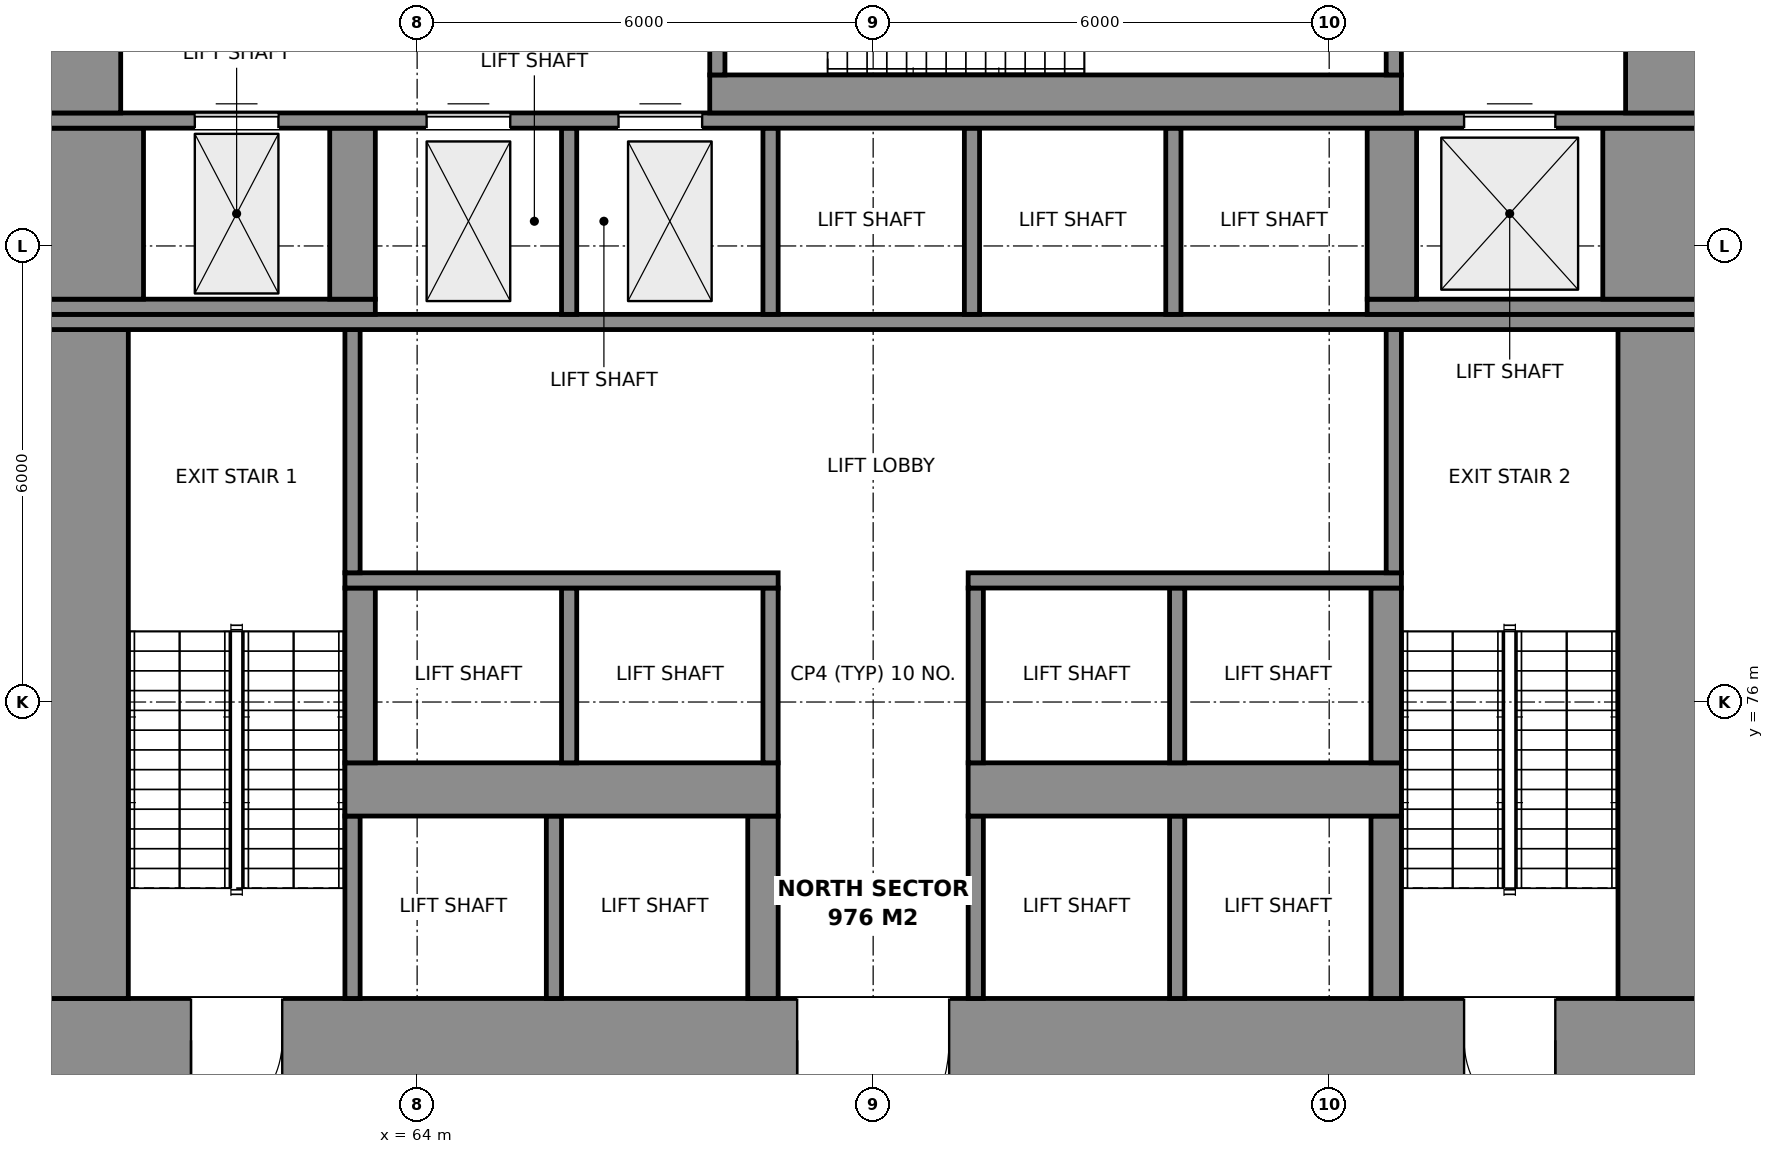
"""IFC4 building model, lengths in metres.
Left out: names, types, materials, properties, quantities, classifications, styles, units other than length and angle.
Written with IfcOpenShell. Run it as: python <this file> out.ifc"""

import sys

from ifc_helpers import new_model, si_unit, direction, frame, frame_2d, origin, place, context, subcontext, project, spatial, rectangle, extrude, element, fill, save


model = new_model("IFC4")
c1 = context("Model", 3, precision=1e-05, world=origin(), true_north=direction((0.0, 1.0)))
c2 = subcontext(c1, "Body", "Model", "MODEL_VIEW")
j1 = project(units=[si_unit("LENGTHUNIT", "METRE"), si_unit("PLANEANGLEUNIT", "RADIAN")], contexts=[c1])
p1 = place(None, origin())
s1 = spatial("IfcSite", under=j1, at=p1, CompositionType="ELEMENT")
p2 = place(p1, origin())
s2 = spatial("IfcBuilding", under=s1, at=p2, CompositionType="ELEMENT")
p3 = place(p2, frame((0.0, 0.0, 137.6)))
s3 = spatial("IfcBuildingStorey", under=s2, at=p3, CompositionType="ELEMENT", Elevation=137.6)
p4 = place(p3, frame((59.0, 71.55, 0.0), z_axis=(0.0, 0.0, 1.0), x_axis=(1.0, 0.0, 0.0)))
e1 = element("IfcWall", 1, at=p4, inside=s3, PredefinedType="SHEAR", context=c2, shape_type="SweptSolid", body=[
    extrude(rectangle(XDim=22.0, YDim=1.1, at=frame_2d((11.0, 0.0))), origin(), (0.0, 0.0, 1.0), 5.0),
])
p5 = place(p4, frame((2.025, 0.0, 0.0)))
e2 = element("IfcOpeningElement", 2, at=p5, cuts=e1, PredefinedType="OPENING", context=c2, shape_type="SweptSolid", body=[
    extrude(rectangle(XDim=1.2, YDim=2.1, at=frame_2d((0.6, 1.05))), frame((0.0, 0.56, 0.0), z_axis=(0.0, -1.0, 0.0), x_axis=(1.0, 0.0, 0.0)), (0.0, 0.0, 1.0), 1.12),
])
p6 = place(p4, frame((18.775, 0.0, 0.0)))
e3 = element("IfcOpeningElement", 3, at=p6, cuts=e1, PredefinedType="OPENING", context=c2, shape_type="SweptSolid", body=[
    extrude(rectangle(XDim=1.2, YDim=2.1, at=frame_2d((0.6, 1.05))), frame((0.0, 0.56, 0.0), z_axis=(0.0, -1.0, 0.0), x_axis=(1.0, 0.0, 0.0)), (0.0, 0.0, 1.0), 1.12),
])
p7 = place(p4, frame((10.0, 0.0, 0.0)))
e4 = element("IfcOpeningElement", 4, at=p7, cuts=e1, PredefinedType="OPENING", context=c2, shape_type="SweptSolid", body=[
    extrude(rectangle(XDim=2.0, YDim=2.1, at=frame_2d((1.0, 1.05))), frame((0.0, 0.56, 0.0), z_axis=(0.0, -1.0, 0.0), x_axis=(1.0, 0.0, 0.0)), (0.0, 0.0, 1.0), 1.12),
])
p8 = place(p3, frame((59.6, 72.1, 0.0), z_axis=(0.0, 0.0, 1.0), x_axis=(0.0, 1.0, 0.0)))
e5 = element("IfcWall", 5, at=p8, inside=s3, PredefinedType="SHEAR", context=c2, shape_type="SweptSolid", body=[
    extrude(rectangle(XDim=8.8, YDim=1.2, at=frame_2d((4.4, 0.0))), origin(), (0.0, 0.0, 1.0), 5.0),
])
for number, where, z_axis, x_axis in (
    (6, (63.15, 72.1, 0.0), (0.0, 0.0, 1.0), (0.0, 1.0, 0.0)),
    (7, (65.8, 72.1, 0.0), (0.0, 0.0, 1.0), (0.0, 1.0, 0.0)),
):
    element("IfcWall", number, at=place(p3, frame(where, z_axis=z_axis, x_axis=x_axis)), inside=s3, PredefinedType="SHEAR", context=c2, shape_type="SweptSolid", body=[
        extrude(rectangle(XDim=2.4, YDim=0.2, at=frame_2d((1.2, 0.0))), origin(), (0.0, 0.0, 1.0), 5.0),
    ])
p9 = place(p3, frame((68.55, 72.1, 0.0), z_axis=(0.0, 0.0, 1.0), x_axis=(0.0, 1.0, 0.0)))
e8 = element("IfcWall", 8, at=p9, inside=s3, PredefinedType="SHEAR", context=c2, shape_type="SweptSolid", body=[
    extrude(rectangle(XDim=2.4, YDim=0.4, at=frame_2d((1.2, 0.0))), origin(), (0.0, 0.0, 1.0), 5.0),
])
for number, where, z_axis, x_axis in (
    (9, (71.35, 72.1, 0.0), (0.0, 0.0, 1.0), (0.0, 1.0, 0.0)),
    (10, (74.0, 72.1, 0.0), (0.0, 0.0, 1.0), (0.0, 1.0, 0.0)),
):
    element("IfcWall", number, at=place(p3, frame(where, z_axis=z_axis, x_axis=x_axis)), inside=s3, PredefinedType="SHEAR", context=c2, shape_type="SweptSolid", body=[
        extrude(rectangle(XDim=2.4, YDim=0.2, at=frame_2d((1.2, 0.0))), origin(), (0.0, 0.0, 1.0), 5.0),
    ])
p10 = place(p3, frame((76.75, 72.1, 0.0), z_axis=(0.0, 0.0, 1.0), x_axis=(0.0, 1.0, 0.0)))
e11 = element("IfcWall", 11, at=p10, inside=s3, PredefinedType="SHEAR", context=c2, shape_type="SweptSolid", body=[
    extrude(rectangle(XDim=2.4, YDim=0.4, at=frame_2d((1.2, 0.0))), origin(), (0.0, 0.0, 1.0), 5.0),
])
p11 = place(p3, frame((80.4, 72.1, 0.0), z_axis=(0.0, 0.0, 1.0), x_axis=(0.0, 1.0, 0.0)))
e12 = element("IfcWall", 12, at=p11, inside=s3, PredefinedType="SHEAR", context=c2, shape_type="SweptSolid", body=[
    extrude(rectangle(XDim=8.8, YDim=1.2, at=frame_2d((4.4, 0.0))), origin(), (0.0, 0.0, 1.0), 5.0),
])
for number, where, z_axis, x_axis in (
    (13, (63.05, 74.85, 0.0), (0.0, 0.0, 1.0), (1.0, 0.0, 0.0)),
    (14, (71.25, 74.85, 0.0), (0.0, 0.0, 1.0), (1.0, 0.0, 0.0)),
):
    element("IfcWall", number, at=place(p3, frame(where, z_axis=z_axis, x_axis=x_axis)), inside=s3, PredefinedType="SHEAR", context=c2, shape_type="SweptSolid", body=[
        extrude(rectangle(XDim=5.7, YDim=0.7, at=frame_2d((2.85, 0.0))), origin(), (0.0, 0.0, 1.0), 5.0),
    ])
p12 = place(p3, frame((63.25, 75.2, 0.0), z_axis=(0.0, 0.0, 1.0), x_axis=(0.0, 1.0, 0.0)))
e15 = element("IfcWall", 15, at=p12, inside=s3, PredefinedType="SHEAR", context=c2, shape_type="SweptSolid", body=[
    extrude(rectangle(XDim=2.3, YDim=0.4, at=frame_2d((1.15, 0.0))), origin(), (0.0, 0.0, 1.0), 5.0),
])
for number, where, z_axis, x_axis in (
    (16, (66.0, 75.2, 0.0), (0.0, 0.0, 1.0), (0.0, 1.0, 0.0)),
    (17, (68.65, 75.2, 0.0), (0.0, 0.0, 1.0), (0.0, 1.0, 0.0)),
    (18, (71.35, 75.2, 0.0), (0.0, 0.0, 1.0), (0.0, 1.0, 0.0)),
    (19, (74.0, 75.2, 0.0), (0.0, 0.0, 1.0), (0.0, 1.0, 0.0)),
):
    element("IfcWall", number, at=place(p3, frame(where, z_axis=z_axis, x_axis=x_axis)), inside=s3, PredefinedType="SHEAR", context=c2, shape_type="SweptSolid", body=[
        extrude(rectangle(XDim=2.3, YDim=0.2, at=frame_2d((1.15, 0.0))), origin(), (0.0, 0.0, 1.0), 5.0),
    ])
p13 = place(p3, frame((76.75, 75.2, 0.0), z_axis=(0.0, 0.0, 1.0), x_axis=(0.0, 1.0, 0.0)))
e20 = element("IfcWall", 20, at=p13, inside=s3, PredefinedType="SHEAR", context=c2, shape_type="SweptSolid", body=[
    extrude(rectangle(XDim=2.3, YDim=0.4, at=frame_2d((1.15, 0.0))), origin(), (0.0, 0.0, 1.0), 5.0),
])
for number, where, z_axis, x_axis in (
    (21, (63.05, 77.6, 0.0), (0.0, 0.0, 1.0), (1.0, 0.0, 0.0)),
    (22, (71.25, 77.6, 0.0), (0.0, 0.0, 1.0), (1.0, 0.0, 0.0)),
):
    element("IfcWall", number, at=place(p3, frame(where, z_axis=z_axis, x_axis=x_axis)), inside=s3, PredefinedType="SHEAR", context=c2, shape_type="SweptSolid", body=[
        extrude(rectangle(XDim=5.7, YDim=0.2, at=frame_2d((2.85, 0.0))), origin(), (0.0, 0.0, 1.0), 5.0),
    ])
for number, where, z_axis, x_axis in (
    (23, (63.15, 77.7, 0.0), (0.0, 0.0, 1.0), (0.0, 1.0, 0.0)),
    (24, (76.85, 77.7, 0.0), (0.0, 0.0, 1.0), (0.0, 1.0, 0.0)),
):
    element("IfcWall", number, at=place(p3, frame(where, z_axis=z_axis, x_axis=x_axis)), inside=s3, PredefinedType="SHEAR", context=c2, shape_type="SweptSolid", body=[
        extrude(rectangle(XDim=3.2, YDim=0.2, at=frame_2d((1.6, 0.0))), origin(), (0.0, 0.0, 1.0), 5.0),
    ])
p14 = place(p3, frame((59.0, 81.0, 0.0), z_axis=(0.0, 0.0, 1.0), x_axis=(1.0, 0.0, 0.0)))
e25 = element("IfcWall", 25, at=p14, inside=s3, PredefinedType="SHEAR", context=c2, shape_type="SweptSolid", body=[
    extrude(rectangle(XDim=22.0, YDim=0.2, at=frame_2d((11.0, 0.0))), origin(), (0.0, 0.0, 1.0), 5.0),
])
p15 = place(p3, frame((59.0, 81.2, 0.0), z_axis=(0.0, 0.0, 1.0), x_axis=(1.0, 0.0, 0.0)))
e26 = element("IfcWall", 26, at=p15, inside=s3, PredefinedType="SHEAR", context=c2, shape_type="SweptSolid", body=[
    extrude(rectangle(XDim=4.45, YDim=0.2, at=frame_2d((2.225, 0.0))), origin(), (0.0, 0.0, 1.0), 5.0),
])
for number, where, z_axis, x_axis in (
    (27, (66.0, 81.1, 0.0), (0.0, 0.0, 1.0), (0.0, 1.0, 0.0)),
    (28, (68.65, 81.1, 0.0), (0.0, 0.0, 1.0), (0.0, 1.0, 0.0)),
    (29, (71.3, 81.1, 0.0), (0.0, 0.0, 1.0), (0.0, 1.0, 0.0)),
    (30, (73.95, 81.1, 0.0), (0.0, 0.0, 1.0), (0.0, 1.0, 0.0)),
):
    element("IfcWall", number, at=place(p3, frame(where, z_axis=z_axis, x_axis=x_axis)), inside=s3, PredefinedType="SHEAR", context=c2, shape_type="SweptSolid", body=[
        extrude(rectangle(XDim=2.45, YDim=0.2, at=frame_2d((1.225, 0.0))), origin(), (0.0, 0.0, 1.0), 5.0),
    ])
p16 = place(p3, frame((76.5, 81.2, 0.0), z_axis=(0.0, 0.0, 1.0), x_axis=(1.0, 0.0, 0.0)))
e31 = element("IfcWall", 31, at=p16, inside=s3, PredefinedType="SHEAR", context=c2, shape_type="SweptSolid", body=[
    extrude(rectangle(XDim=4.5, YDim=0.2, at=frame_2d((2.25, 0.0))), origin(), (0.0, 0.0, 1.0), 5.0),
])
p17 = place(p3, frame((59.7, 81.3, 0.0), z_axis=(0.0, 0.0, 1.0), x_axis=(0.0, 1.0, 0.0)))
e32 = element("IfcWall", 32, at=p17, inside=s3, PredefinedType="SHEAR", context=c2, shape_type="SweptSolid", body=[
    extrude(rectangle(XDim=2.25, YDim=1.4, at=frame_2d((1.125, 0.0))), origin(), (0.0, 0.0, 1.0), 5.0),
])
p18 = place(p3, frame((63.15, 81.3, 0.0), z_axis=(0.0, 0.0, 1.0), x_axis=(0.0, 1.0, 0.0)))
e33 = element("IfcWall", 33, at=p18, inside=s3, PredefinedType="SHEAR", context=c2, shape_type="SweptSolid", body=[
    extrude(rectangle(XDim=2.25, YDim=0.6, at=frame_2d((1.125, 0.0))), origin(), (0.0, 0.0, 1.0), 5.0),
])
p19 = place(p3, frame((76.825, 81.3, 0.0), z_axis=(0.0, 0.0, 1.0), x_axis=(0.0, 1.0, 0.0)))
e34 = element("IfcWall", 34, at=p19, inside=s3, PredefinedType="SHEAR", context=c2, shape_type="SweptSolid", body=[
    extrude(rectangle(XDim=2.25, YDim=0.65, at=frame_2d((1.125, 0.0))), origin(), (0.0, 0.0, 1.0), 5.0),
])
p20 = place(p3, frame((80.3, 81.3, 0.0), z_axis=(0.0, 0.0, 1.0), x_axis=(0.0, 1.0, 0.0)))
e35 = element("IfcWall", 35, at=p20, inside=s3, PredefinedType="SHEAR", context=c2, shape_type="SweptSolid", body=[
    extrude(rectangle(XDim=2.25, YDim=1.4, at=frame_2d((1.125, 0.0))), origin(), (0.0, 0.0, 1.0), 5.0),
])
p21 = place(p3, frame((59.0, 83.65, 0.0), z_axis=(0.0, 0.0, 1.0), x_axis=(1.0, 0.0, 0.0)))
e36 = element("IfcWall", 36, at=p21, inside=s3, PredefinedType="SHEAR", context=c2, shape_type="SweptSolid", body=[
    extrude(rectangle(XDim=22.0, YDim=0.2, at=frame_2d((11.0, 0.0))), origin(), (0.0, 0.0, 1.0), 5.0),
])
p22 = place(p21, frame((5.125, 0.0, 0.0)))
e37 = element("IfcOpeningElement", 37, at=p22, cuts=e36, PredefinedType="OPENING", context=c2, shape_type="SweptSolid", body=[
    extrude(rectangle(XDim=1.1, YDim=2.1, at=frame_2d((0.55, 1.05))), frame((0.0, 0.11, 0.0), z_axis=(0.0, -1.0, 0.0), x_axis=(1.0, 0.0, 0.0)), (0.0, 0.0, 1.0), 0.22),
])
p23 = place(p21, frame((7.65, 0.0, 0.0)))
e38 = element("IfcOpeningElement", 38, at=p23, cuts=e36, PredefinedType="OPENING", context=c2, shape_type="SweptSolid", body=[
    extrude(rectangle(XDim=1.1, YDim=2.1, at=frame_2d((0.55, 1.05))), frame((0.0, 0.11, 0.0), z_axis=(0.0, -1.0, 0.0), x_axis=(1.0, 0.0, 0.0)), (0.0, 0.0, 1.0), 0.22),
])
p24 = place(p21, frame((18.775, 0.0, 0.0)))
e39 = element("IfcOpeningElement", 39, at=p24, cuts=e36, PredefinedType="OPENING", context=c2, shape_type="SweptSolid", body=[
    extrude(rectangle(XDim=1.2, YDim=2.1, at=frame_2d((0.6, 1.05))), frame((0.0, 0.11, 0.0), z_axis=(0.0, -1.0, 0.0), x_axis=(1.0, 0.0, 0.0)), (0.0, 0.0, 1.0), 0.22),
])
p25 = place(p21, frame((2.075, 0.0, 0.0)))
e40 = element("IfcOpeningElement", 40, at=p25, cuts=e36, PredefinedType="OPENING", context=c2, shape_type="SweptSolid", body=[
    extrude(rectangle(XDim=1.1, YDim=2.1, at=frame_2d((0.55, 1.05))), frame((0.0, 0.11, 0.0), z_axis=(0.0, -1.0, 0.0), x_axis=(1.0, 0.0, 0.0)), (0.0, 0.0, 1.0), 0.22),
])
p26 = place(p3, frame((59.55, 83.75, 0.0), z_axis=(0.0, 0.0, 1.0), x_axis=(0.0, 1.0, 0.0)))
e41 = element("IfcWall", 41, at=p26, inside=s3, PredefinedType="SHEAR", context=c2, shape_type="SweptSolid", body=[
    extrude(rectangle(XDim=3.15, YDim=1.1, at=frame_2d((1.575, 0.0))), origin(), (0.0, 0.0, 1.0), 5.0),
])
p27 = place(p26, frame((1.025, 0.0, 0.0)))
e42 = element("IfcOpeningElement", 42, at=p27, cuts=e41, PredefinedType="OPENING", context=c2, shape_type="SweptSolid", body=[
    extrude(rectangle(XDim=1.1, YDim=2.1, at=frame_2d((0.55, 1.05))), frame((0.0, 0.56, 0.0), z_axis=(0.0, -1.0, 0.0), x_axis=(1.0, 0.0, 0.0)), (0.0, 0.0, 1.0), 1.12),
])
p28 = place(p3, frame((67.85, 84.0, 0.0), z_axis=(0.0, 0.0, 1.0), x_axis=(1.0, 0.0, 0.0)))
e43 = element("IfcWall", 43, at=p28, inside=s3, PredefinedType="SHEAR", context=c2, shape_type="SweptSolid", body=[
    extrude(rectangle(XDim=9.1, YDim=0.5, at=frame_2d((4.55, 0.0))), origin(), (0.0, 0.0, 1.0), 5.0),
])
p29 = place(p3, frame((80.45, 83.75, 0.0), z_axis=(0.0, 0.0, 1.0), x_axis=(0.0, 1.0, 0.0)))
e44 = element("IfcWall", 44, at=p29, inside=s3, PredefinedType="SHEAR", context=c2, shape_type="SweptSolid", body=[
    extrude(rectangle(XDim=3.15, YDim=1.1, at=frame_2d((1.575, 0.0))), origin(), (0.0, 0.0, 1.0), 5.0),
])
p30 = place(p29, frame((0.975, 0.0, 0.0)))
e45 = element("IfcOpeningElement", 45, at=p30, cuts=e44, PredefinedType="OPENING", context=c2, shape_type="SweptSolid", body=[
    extrude(rectangle(XDim=1.2, YDim=2.1, at=frame_2d((0.6, 1.05))), frame((0.0, 0.56, 0.0), z_axis=(0.0, -1.0, 0.0), x_axis=(1.0, 0.0, 0.0)), (0.0, 0.0, 1.0), 1.12),
])
p31 = place(p3, frame((67.95, 84.25, 0.0), z_axis=(0.0, 0.0, 1.0), x_axis=(0.0, 1.0, 0.0)))
e46 = element("IfcWall", 46, at=p31, inside=s3, PredefinedType="SHEAR", context=c2, shape_type="SweptSolid", body=[
    extrude(rectangle(XDim=2.65, YDim=0.2, at=frame_2d((1.325, 0.0))), origin(), (0.0, 0.0, 1.0), 5.0),
])
p32 = place(p31, frame((0.825, 0.0, 0.0)))
e47 = element("IfcOpeningElement", 47, at=p32, cuts=e46, PredefinedType="OPENING", context=c2, shape_type="SweptSolid", body=[
    extrude(rectangle(XDim=1.2, YDim=2.1, at=frame_2d((0.6, 1.05))), frame((0.0, 0.11, 0.0), z_axis=(0.0, -1.0, 0.0), x_axis=(1.0, 0.0, 0.0)), (0.0, 0.0, 1.0), 0.22),
])
p33 = place(p3, frame((76.85, 84.25, 0.0), z_axis=(0.0, 0.0, 1.0), x_axis=(0.0, 1.0, 0.0)))
e48 = element("IfcWall", 48, at=p33, inside=s3, PredefinedType="SHEAR", context=c2, shape_type="SweptSolid", body=[
    extrude(rectangle(XDim=2.65, YDim=0.2, at=frame_2d((1.325, 0.0))), origin(), (0.0, 0.0, 1.0), 5.0),
])
p34 = place(p5, frame((1.2, 0.0, 0.0), z_axis=(0.0, 0.0, 1.0), x_axis=(-1.0, 0.0, 0.0)))
e49 = element("IfcDoor", 49, at=p34, inside=s3, OperationType="SINGLE_SWING_RIGHT", PredefinedType="DOOR", context=c2, shape_type="SweptSolid", body=[
    extrude(rectangle(XDim=1.2, YDim=2.1, at=frame_2d((0.6, 1.05))), frame((0.0, 0.025, 0.0), z_axis=(0.0, -1.0, 0.0), x_axis=(1.0, 0.0, 0.0)), (0.0, 0.0, 1.0), 0.05),
])
fill(e2, e49)
p35 = place(p6, frame((1.2, 0.0, 0.0), z_axis=(0.0, 0.0, 1.0), x_axis=(-1.0, 0.0, 0.0)))
e50 = element("IfcDoor", 50, at=p35, inside=s3, OperationType="SINGLE_SWING_LEFT", PredefinedType="DOOR", context=c2, shape_type="SweptSolid", body=[
    extrude(rectangle(XDim=1.2, YDim=2.1, at=frame_2d((0.6, 1.05))), frame((0.0, 0.025, 0.0), z_axis=(0.0, -1.0, 0.0), x_axis=(1.0, 0.0, 0.0)), (0.0, 0.0, 1.0), 0.05),
])
fill(e3, e50)
p36 = place(p7, frame((2.0, 0.0, 0.0), z_axis=(0.0, 0.0, 1.0), x_axis=(-1.0, 0.0, 0.0)))
e51 = element("IfcDoor", 51, at=p36, inside=s3, OperationType="DOUBLE_DOOR_SINGLE_SWING", PredefinedType="DOOR", context=c2, shape_type="SweptSolid", body=[
    extrude(rectangle(XDim=2.0, YDim=2.1, at=frame_2d((1.0, 1.05))), frame((0.0, 0.025, 0.0), z_axis=(0.0, -1.0, 0.0), x_axis=(1.0, 0.0, 0.0)), (0.0, 0.0, 1.0), 0.05),
])
fill(e4, e51)
p37 = place(p22, origin())
e52 = element("IfcDoor", 52, at=p37, inside=s3, OperationType="DOUBLE_DOOR_SLIDING", PredefinedType="DOOR", context=c2, shape_type="SweptSolid", body=[
    extrude(rectangle(XDim=1.1, YDim=2.1, at=frame_2d((0.55, 1.05))), frame((0.0, 0.025, 0.0), z_axis=(0.0, -1.0, 0.0), x_axis=(1.0, 0.0, 0.0)), (0.0, 0.0, 1.0), 0.05),
])
fill(e37, e52)
p38 = place(p23, origin())
e53 = element("IfcDoor", 53, at=p38, inside=s3, OperationType="DOUBLE_DOOR_SLIDING", PredefinedType="DOOR", context=c2, shape_type="SweptSolid", body=[
    extrude(rectangle(XDim=1.1, YDim=2.1, at=frame_2d((0.55, 1.05))), frame((0.0, 0.025, 0.0), z_axis=(0.0, -1.0, 0.0), x_axis=(1.0, 0.0, 0.0)), (0.0, 0.0, 1.0), 0.05),
])
fill(e38, e53)
p39 = place(p24, origin())
e54 = element("IfcDoor", 54, at=p39, inside=s3, OperationType="DOUBLE_DOOR_SLIDING", PredefinedType="DOOR", context=c2, shape_type="SweptSolid", body=[
    extrude(rectangle(XDim=1.2, YDim=2.1, at=frame_2d((0.6, 1.05))), frame((0.0, 0.025, 0.0), z_axis=(0.0, -1.0, 0.0), x_axis=(1.0, 0.0, 0.0)), (0.0, 0.0, 1.0), 0.05),
])
fill(e39, e54)
p40 = place(p25, origin())
e55 = element("IfcDoor", 55, at=p40, inside=s3, OperationType="DOUBLE_DOOR_SLIDING", PredefinedType="DOOR", context=c2, shape_type="SweptSolid", body=[
    extrude(rectangle(XDim=1.1, YDim=2.1, at=frame_2d((0.55, 1.05))), frame((0.0, 0.025, 0.0), z_axis=(0.0, -1.0, 0.0), x_axis=(1.0, 0.0, 0.0)), (0.0, 0.0, 1.0), 0.05),
])
fill(e40, e55)
save(model, sys.argv[1])
